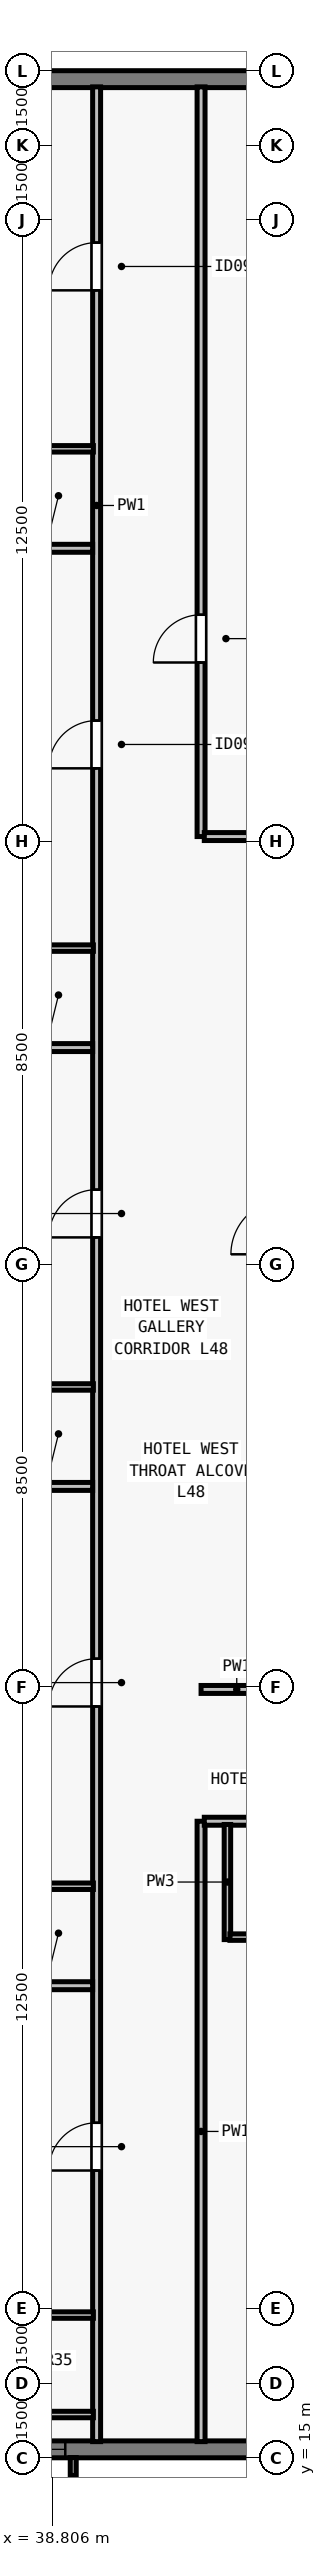
"""IFC4 building model, lengths in metres.
Left out: names, types, materials, properties, quantities, classifications, styles, units other than length and angle.
Written with IfcOpenShell. Run it as: python <this file> out.ifc"""

import sys

from ifc_helpers import new_model, si_unit, direction, frame, frame_2d, origin, place, context, subcontext, project, spatial, rectangle, extrude, element, fill, save


model = new_model("IFC4")
c1 = context("Model", 3, precision=1e-05, world=origin(), true_north=direction((0.0, 1.0)))
c2 = subcontext(c1, "Body", "Model", "MODEL_VIEW")
j1 = project(units=[si_unit("LENGTHUNIT", "METRE"), si_unit("PLANEANGLEUNIT", "RADIAN")], contexts=[c1])
p1 = place(None, origin())
s1 = spatial("IfcSite", under=j1, at=p1, CompositionType="ELEMENT")
p2 = place(p1, origin())
s2 = spatial("IfcBuilding", under=s1, at=p2, CompositionType="ELEMENT")
p3 = place(p2, frame((0.0, 0.0, 176.0)))
s3 = spatial("IfcBuildingStorey", under=s2, at=p3, CompositionType="ELEMENT", Elevation=176.0)
p4 = place(p3, frame((72.0, 15.17, 0.0), z_axis=(0.0, 0.0, 1.0), x_axis=(-1.0, 0.0, 0.0)))
e1 = element("IfcWall", 1, at=p4, inside=s3, PredefinedType="SOLIDWALL", context=c2, shape_type="SweptSolid", body=[
    extrude(rectangle(XDim=39.682, YDim=0.34, at=frame_2d((19.841, 0.0))), origin(), (0.0, 0.0, 1.0), 3.28),
])
p5 = place(p4, frame((4.102, 0.0, 0.8)))
e2 = element("IfcOpeningElement", 2, at=p5, cuts=e1, PredefinedType="OPENING", context=c2, shape_type="SweptSolid", body=[
    extrude(rectangle(XDim=1.35, YDim=1.66, at=frame_2d((0.675, 0.83))), frame((0.0, 0.18, 0.0), z_axis=(0.0, -1.0, 0.0), x_axis=(1.0, 0.0, 0.0)), (0.0, 0.0, 1.0), 0.36),
])
p6 = place(p4, frame((8.305, 0.0, 0.8)))
e3 = element("IfcOpeningElement", 3, at=p6, cuts=e1, PredefinedType="OPENING", context=c2, shape_type="SweptSolid", body=[
    extrude(rectangle(XDim=1.75, YDim=1.66, at=frame_2d((0.875, 0.83))), frame((0.0, 0.18, 0.0), z_axis=(0.0, -1.0, 0.0), x_axis=(1.0, 0.0, 0.0)), (0.0, 0.0, 1.0), 0.36),
])
p7 = place(p4, frame((12.059, 0.0, 0.8)))
e4 = element("IfcOpeningElement", 4, at=p7, cuts=e1, PredefinedType="OPENING", context=c2, shape_type="SweptSolid", body=[
    extrude(rectangle(XDim=1.35, YDim=1.66, at=frame_2d((0.675, 0.83))), frame((0.0, 0.18, 0.0), z_axis=(0.0, -1.0, 0.0), x_axis=(1.0, 0.0, 0.0)), (0.0, 0.0, 1.0), 0.36),
])
p8 = place(p4, frame((16.262, 0.0, 0.8)))
e5 = element("IfcOpeningElement", 5, at=p8, cuts=e1, PredefinedType="OPENING", context=c2, shape_type="SweptSolid", body=[
    extrude(rectangle(XDim=1.75, YDim=1.66, at=frame_2d((0.875, 0.83))), frame((0.0, 0.18, 0.0), z_axis=(0.0, -1.0, 0.0), x_axis=(1.0, 0.0, 0.0)), (0.0, 0.0, 1.0), 0.36),
])
p9 = place(p4, frame((19.166, 0.0, 0.8)))
e6 = element("IfcOpeningElement", 6, at=p9, cuts=e1, PredefinedType="OPENING", context=c2, shape_type="SweptSolid", body=[
    extrude(rectangle(XDim=1.35, YDim=1.66, at=frame_2d((0.675, 0.83))), frame((0.0, 0.18, 0.0), z_axis=(0.0, -1.0, 0.0), x_axis=(1.0, 0.0, 0.0)), (0.0, 0.0, 1.0), 0.36),
])
p10 = place(p4, frame((21.27, 0.0, 0.8)))
e7 = element("IfcOpeningElement", 7, at=p10, cuts=e1, PredefinedType="OPENING", context=c2, shape_type="SweptSolid", body=[
    extrude(rectangle(XDim=1.75, YDim=1.66, at=frame_2d((0.875, 0.83))), frame((0.0, 0.18, 0.0), z_axis=(0.0, -1.0, 0.0), x_axis=(1.0, 0.0, 0.0)), (0.0, 0.0, 1.0), 0.36),
])
p11 = place(p4, frame((26.273, 0.0, 0.8)))
e8 = element("IfcOpeningElement", 8, at=p11, cuts=e1, PredefinedType="OPENING", context=c2, shape_type="SweptSolid", body=[
    extrude(rectangle(XDim=1.35, YDim=1.66, at=frame_2d((0.675, 0.83))), frame((0.0, 0.18, 0.0), z_axis=(0.0, -1.0, 0.0), x_axis=(1.0, 0.0, 0.0)), (0.0, 0.0, 1.0), 0.36),
])
p12 = place(p4, frame((32.93, 0.0, 0.8)))
e9 = element("IfcOpeningElement", 9, at=p12, cuts=e1, PredefinedType="OPENING", context=c2, shape_type="SweptSolid", body=[
    extrude(rectangle(XDim=1.35, YDim=1.66, at=frame_2d((0.675, 0.83))), frame((0.0, 0.18, 0.0), z_axis=(0.0, -1.0, 0.0), x_axis=(1.0, 0.0, 0.0)), (0.0, 0.0, 1.0), 0.36),
])
p13 = place(p3, frame((32.0, 62.83, 0.0), z_axis=(0.0, 0.0, 1.0), x_axis=(1.0, 0.0, 0.0)))
e10 = element("IfcWall", 10, at=p13, inside=s3, PredefinedType="SOLIDWALL", context=c2, shape_type="SweptSolid", body=[
    extrude(rectangle(XDim=39.682, YDim=0.34, at=frame_2d((19.841, 0.0))), origin(), (0.0, 0.0, 1.0), 3.28),
])
p14 = place(p13, frame((4.952, 0.0, 0.8)))
e11 = element("IfcOpeningElement", 11, at=p14, cuts=e10, PredefinedType="OPENING", context=c2, shape_type="SweptSolid", body=[
    extrude(rectangle(XDim=1.35, YDim=1.66, at=frame_2d((0.675, 0.83))), frame((0.0, 0.18, 0.0), z_axis=(0.0, -1.0, 0.0), x_axis=(1.0, 0.0, 0.0)), (0.0, 0.0, 1.0), 0.36),
])
p15 = place(p13, frame((12.059, 0.0, 0.8)))
e12 = element("IfcOpeningElement", 12, at=p15, cuts=e10, PredefinedType="OPENING", context=c2, shape_type="SweptSolid", body=[
    extrude(rectangle(XDim=1.35, YDim=1.66, at=frame_2d((0.675, 0.83))), frame((0.0, 0.18, 0.0), z_axis=(0.0, -1.0, 0.0), x_axis=(1.0, 0.0, 0.0)), (0.0, 0.0, 1.0), 0.36),
])
p16 = place(p13, frame((19.166, 0.0, 0.8)))
e13 = element("IfcOpeningElement", 13, at=p16, cuts=e10, PredefinedType="OPENING", context=c2, shape_type="SweptSolid", body=[
    extrude(rectangle(XDim=1.35, YDim=1.66, at=frame_2d((0.675, 0.83))), frame((0.0, 0.18, 0.0), z_axis=(0.0, -1.0, 0.0), x_axis=(1.0, 0.0, 0.0)), (0.0, 0.0, 1.0), 0.36),
])
p17 = place(p13, frame((21.27, 0.0, 0.8)))
e14 = element("IfcOpeningElement", 14, at=p17, cuts=e10, PredefinedType="OPENING", context=c2, shape_type="SweptSolid", body=[
    extrude(rectangle(XDim=1.75, YDim=1.66, at=frame_2d((0.875, 0.83))), frame((0.0, 0.18, 0.0), z_axis=(0.0, -1.0, 0.0), x_axis=(1.0, 0.0, 0.0)), (0.0, 0.0, 1.0), 0.36),
])
p18 = place(p13, frame((26.273, 0.0, 0.8)))
e15 = element("IfcOpeningElement", 15, at=p18, cuts=e10, PredefinedType="OPENING", context=c2, shape_type="SweptSolid", body=[
    extrude(rectangle(XDim=1.35, YDim=1.66, at=frame_2d((0.675, 0.83))), frame((0.0, 0.18, 0.0), z_axis=(0.0, -1.0, 0.0), x_axis=(1.0, 0.0, 0.0)), (0.0, 0.0, 1.0), 0.36),
])
p19 = place(p13, frame((29.627, 0.0, 0.8)))
e16 = element("IfcOpeningElement", 16, at=p19, cuts=e10, PredefinedType="OPENING", context=c2, shape_type="SweptSolid", body=[
    extrude(rectangle(XDim=1.75, YDim=1.66, at=frame_2d((0.875, 0.83))), frame((0.0, 0.18, 0.0), z_axis=(0.0, -1.0, 0.0), x_axis=(1.0, 0.0, 0.0)), (0.0, 0.0, 1.0), 0.36),
])
p20 = place(p13, frame((34.47, 0.0, 0.8)))
e17 = element("IfcOpeningElement", 17, at=p20, cuts=e10, PredefinedType="OPENING", context=c2, shape_type="SweptSolid", body=[
    extrude(rectangle(XDim=0.9, YDim=1.66, at=frame_2d((0.45, 0.83))), frame((0.0, 0.18, 0.0), z_axis=(0.0, -1.0, 0.0), x_axis=(1.0, 0.0, 0.0)), (0.0, 0.0, 1.0), 0.36),
])
p21 = place(p3, frame((39.7, 15.325, 0.0), z_axis=(0.0, 0.0, 1.0), x_axis=(0.0, 1.0, 0.0)))
e18 = element("IfcWall", 18, at=p21, inside=s3, PredefinedType="PARTITIONING", context=c2, shape_type="SweptSolid", body=[
    extrude(rectangle(XDim=47.35, YDim=0.16, at=frame_2d((23.675, 0.0))), origin(), (0.0, 0.0, 1.0), 2.555),
])
p22 = place(p21, frame((5.451, 0.0, 0.0)))
e19 = element("IfcOpeningElement", 19, at=p22, cuts=e18, PredefinedType="OPENING", context=c2, shape_type="SweptSolid", body=[
    extrude(rectangle(XDim=0.96, YDim=2.15, at=frame_2d((0.48, 1.075))), frame((0.0, 0.09, 0.0), z_axis=(0.0, -1.0, 0.0), x_axis=(1.0, 0.0, 0.0)), (0.0, 0.0, 1.0), 0.18),
])
p23 = place(p21, frame((14.783, 0.0, 0.0)))
e20 = element("IfcOpeningElement", 20, at=p23, cuts=e18, PredefinedType="OPENING", context=c2, shape_type="SweptSolid", body=[
    extrude(rectangle(XDim=0.96, YDim=2.15, at=frame_2d((0.48, 1.075))), frame((0.0, 0.09, 0.0), z_axis=(0.0, -1.0, 0.0), x_axis=(1.0, 0.0, 0.0)), (0.0, 0.0, 1.0), 0.18),
])
p24 = place(p21, frame((24.215, 0.0, 0.0)))
e21 = element("IfcOpeningElement", 21, at=p24, cuts=e18, PredefinedType="OPENING", context=c2, shape_type="SweptSolid", body=[
    extrude(rectangle(XDim=0.96, YDim=2.15, at=frame_2d((0.48, 1.075))), frame((0.0, 0.09, 0.0), z_axis=(0.0, -1.0, 0.0), x_axis=(1.0, 0.0, 0.0)), (0.0, 0.0, 1.0), 0.18),
])
p25 = place(p21, frame((33.647, 0.0, 0.0)))
e22 = element("IfcOpeningElement", 22, at=p25, cuts=e18, PredefinedType="OPENING", context=c2, shape_type="SweptSolid", body=[
    extrude(rectangle(XDim=0.96, YDim=2.15, at=frame_2d((0.48, 1.075))), frame((0.0, 0.09, 0.0), z_axis=(0.0, -1.0, 0.0), x_axis=(1.0, 0.0, 0.0)), (0.0, 0.0, 1.0), 0.18),
])
p26 = place(p21, frame((43.258, 0.0, 0.0)))
e23 = element("IfcOpeningElement", 23, at=p26, cuts=e18, PredefinedType="OPENING", context=c2, shape_type="SweptSolid", body=[
    extrude(rectangle(XDim=0.96, YDim=2.15, at=frame_2d((0.48, 1.075))), frame((0.0, 0.09, 0.0), z_axis=(0.0, -1.0, 0.0), x_axis=(1.0, 0.0, 0.0)), (0.0, 0.0, 1.0), 0.18),
])
p27 = place(p3, frame((41.8, 15.325, 0.0), z_axis=(0.0, 0.0, 1.0), x_axis=(0.0, 1.0, 0.0)))
e24 = element("IfcWall", 24, at=p27, inside=s3, PredefinedType="PARTITIONING", context=c2, shape_type="SweptSolid", body=[
    extrude(rectangle(XDim=12.475, YDim=0.16, at=frame_2d((6.238, 0.0))), origin(), (0.0, 0.0, 1.0), 3.28),
])
p28 = place(p3, frame((41.8, 47.6, 0.0), z_axis=(0.0, 0.0, 1.0), x_axis=(0.0, 1.0, 0.0)))
e25 = element("IfcWall", 25, at=p28, inside=s3, PredefinedType="PARTITIONING", context=c2, shape_type="SweptSolid", body=[
    extrude(rectangle(XDim=15.075, YDim=0.16, at=frame_2d((7.538, 0.0))), origin(), (0.0, 0.0, 1.0), 2.555),
])
p29 = place(p28, frame((3.5, 0.0, 0.0)))
e26 = element("IfcOpeningElement", 26, at=p29, cuts=e25, PredefinedType="OPENING", context=c2, shape_type="SweptSolid", body=[
    extrude(rectangle(XDim=0.96, YDim=2.12, at=frame_2d((0.48, 1.06))), frame((0.0, 0.09, 0.0), z_axis=(0.0, -1.0, 0.0), x_axis=(1.0, 0.0, 0.0)), (0.0, 0.0, 1.0), 0.18),
])
p30 = place(p3, frame((41.8, 30.45, 0.0), z_axis=(0.0, 0.0, 1.0), x_axis=(1.0, 0.0, 0.0)))
e27 = element("IfcWall", 27, at=p30, inside=s3, PredefinedType="PARTITIONING", context=c2, shape_type="SweptSolid", body=[
    extrude(rectangle(XDim=1.435, YDim=0.16, at=frame_2d((0.718, 0.0))), origin(), (0.0, 0.0, 1.0), 3.28),
])
p31 = place(p3, frame((41.865, 47.6, 0.0), z_axis=(0.0, 0.0, 1.0), x_axis=(1.0, 0.0, 0.0)))
e28 = element("IfcWall", 28, at=p31, inside=s3, PredefinedType="PARTITIONING", context=c2, shape_type="SweptSolid", body=[
    extrude(rectangle(XDim=1.37, YDim=0.16, at=frame_2d((0.685, 0.0))), origin(), (0.0, 0.0, 1.0), 3.28),
])
p32 = place(p3, frame((41.865, 27.8, 0.0), z_axis=(0.0, 0.0, 1.0), x_axis=(1.0, 0.0, 0.0)))
e29 = element("IfcWall", 29, at=p32, inside=s3, PredefinedType="PARTITIONING", context=c2, shape_type="SweptSolid", body=[
    extrude(rectangle(XDim=22.07, YDim=0.16, at=frame_2d((11.035, 0.0))), origin(), (0.0, 0.0, 1.0), 3.28),
])
p33 = place(p32, frame((4.232, 0.0, 0.0)))
e30 = element("IfcOpeningElement", 30, at=p33, cuts=e29, PredefinedType="OPENING", context=c2, shape_type="SweptSolid", body=[
    extrude(rectangle(XDim=0.96, YDim=2.15, at=frame_2d((0.48, 1.075))), frame((0.0, 0.09, 0.0), z_axis=(0.0, -1.0, 0.0), x_axis=(1.0, 0.0, 0.0)), (0.0, 0.0, 1.0), 0.18),
])
p34 = place(p32, frame((11.545, 0.0, 0.0)))
e31 = element("IfcOpeningElement", 31, at=p34, cuts=e29, PredefinedType="OPENING", context=c2, shape_type="SweptSolid", body=[
    extrude(rectangle(XDim=0.96, YDim=2.15, at=frame_2d((0.48, 1.075))), frame((0.0, 0.09, 0.0), z_axis=(0.0, -1.0, 0.0), x_axis=(1.0, 0.0, 0.0)), (0.0, 0.0, 1.0), 0.18),
])
p35 = place(p32, frame((19.168, 0.0, 0.0)))
e32 = element("IfcOpeningElement", 32, at=p35, cuts=e29, PredefinedType="OPENING", context=c2, shape_type="SweptSolid", body=[
    extrude(rectangle(XDim=0.96, YDim=2.15, at=frame_2d((0.48, 1.075))), frame((0.0, 0.09, 0.0), z_axis=(0.0, -1.0, 0.0), x_axis=(1.0, 0.0, 0.0)), (0.0, 0.0, 1.0), 0.18),
])
p36 = place(p3, frame((42.33, 25.42, 0.0), z_axis=(0.0, 0.0, 1.0), x_axis=(0.0, 1.0, 0.0)))
e33 = element("IfcWall", 33, at=p36, inside=s3, PredefinedType="PLUMBINGWALL", context=c2, shape_type="SweptSolid", body=[
    extrude(rectangle(XDim=2.315, YDim=0.13, at=frame_2d((1.158, 0.0))), origin(), (0.0, 0.0, 1.0), 3.28),
])
p37 = place(p3, frame((42.38, 25.47, 0.0), z_axis=(0.0, 0.0, 1.0), x_axis=(1.0, 0.0, 0.0)))
e34 = element("IfcWall", 34, at=p37, inside=s3, PredefinedType="PLUMBINGWALL", context=c2, shape_type="SweptSolid", body=[
    extrude(rectangle(XDim=1.9, YDim=0.13, at=frame_2d((0.95, 0.0))), origin(), (0.0, 0.0, 1.0), 3.28),
])
p38 = place(p37, frame((0.54, 0.0, 0.0)))
e35 = element("IfcOpeningElement", 35, at=p38, cuts=e34, PredefinedType="OPENING", context=c2, shape_type="SweptSolid", body=[
    extrude(rectangle(XDim=0.82, YDim=2.1, at=frame_2d((0.41, 1.05))), frame((0.0, 0.075, 0.0), z_axis=(0.0, -1.0, 0.0), x_axis=(1.0, 0.0, 0.0)), (0.0, 0.0, 1.0), 0.15),
])
for number, where, z_axis, x_axis in (
    (36, (37.32, 15.87, 0.0), (0.0, 0.0, 1.0), (1.0, 0.0, 0.0)),
    (37, (37.32, 17.87, 0.0), (0.0, 0.0, 1.0), (1.0, 0.0, 0.0)),
):
    element("IfcWall", number, at=place(p3, frame(where, z_axis=z_axis, x_axis=x_axis)), inside=s3, PredefinedType="PLUMBINGWALL", context=c2, shape_type="SweptSolid", body=[
        extrude(rectangle(XDim=2.315, YDim=0.13, at=frame_2d((1.157, 0.0))), origin(), (0.0, 0.0, 1.0), 3.28),
    ])
p39 = place(p3, frame((28.325, 24.493, 0.0), z_axis=(0.0, 0.0, 1.0), x_axis=(1.0, 0.0, 0.0)))
e38 = element("IfcWall", 38, at=p39, inside=s3, PredefinedType="PARTITIONING", context=c2, shape_type="SweptSolid", body=[
    extrude(rectangle(XDim=11.295, YDim=0.16, at=frame_2d((5.647, 0.0))), origin(), (0.0, 0.0, 1.0), 2.896),
])
p40 = place(p3, frame((37.32, 26.493, 0.0), z_axis=(0.0, 0.0, 1.0), x_axis=(1.0, 0.0, 0.0)))
e39 = element("IfcWall", 39, at=p40, inside=s3, PredefinedType="PLUMBINGWALL", context=c2, shape_type="SweptSolid", body=[
    extrude(rectangle(XDim=2.315, YDim=0.13, at=frame_2d((1.157, 0.0))), origin(), (0.0, 0.0, 1.0), 2.896),
])
p41 = place(p3, frame((28.325, 34.533, 0.0), z_axis=(0.0, 0.0, 1.0), x_axis=(1.0, 0.0, 0.0)))
e40 = element("IfcWall", 40, at=p41, inside=s3, PredefinedType="PARTITIONING", context=c2, shape_type="SweptSolid", body=[
    extrude(rectangle(XDim=11.295, YDim=0.16, at=frame_2d((5.647, 0.0))), origin(), (0.0, 0.0, 1.0), 2.896),
])
p42 = place(p3, frame((37.32, 36.533, 0.0), z_axis=(0.0, 0.0, 1.0), x_axis=(1.0, 0.0, 0.0)))
e41 = element("IfcWall", 41, at=p42, inside=s3, PredefinedType="PLUMBINGWALL", context=c2, shape_type="SweptSolid", body=[
    extrude(rectangle(XDim=2.315, YDim=0.13, at=frame_2d((1.157, 0.0))), origin(), (0.0, 0.0, 1.0), 3.28),
])
p43 = place(p3, frame((28.325, 43.357, 0.0), z_axis=(0.0, 0.0, 1.0), x_axis=(1.0, 0.0, 0.0)))
e42 = element("IfcWall", 42, at=p43, inside=s3, PredefinedType="PARTITIONING", context=c2, shape_type="SweptSolid", body=[
    extrude(rectangle(XDim=11.295, YDim=0.16, at=frame_2d((5.647, 0.0))), origin(), (0.0, 0.0, 1.0), 2.896),
])
p44 = place(p3, frame((37.32, 45.357, 0.0), z_axis=(0.0, 0.0, 1.0), x_axis=(1.0, 0.0, 0.0)))
e43 = element("IfcWall", 43, at=p44, inside=s3, PredefinedType="PLUMBINGWALL", context=c2, shape_type="SweptSolid", body=[
    extrude(rectangle(XDim=2.315, YDim=0.13, at=frame_2d((1.157, 0.0))), origin(), (0.0, 0.0, 1.0), 3.28),
])
p45 = place(p3, frame((28.325, 53.396, 0.0), z_axis=(0.0, 0.0, 1.0), x_axis=(1.0, 0.0, 0.0)))
e44 = element("IfcWall", 44, at=p45, inside=s3, PredefinedType="PARTITIONING", context=c2, shape_type="SweptSolid", body=[
    extrude(rectangle(XDim=11.295, YDim=0.16, at=frame_2d((5.647, 0.0))), origin(), (0.0, 0.0, 1.0), 2.896),
])
p46 = place(p3, frame((37.32, 55.396, 0.0), z_axis=(0.0, 0.0, 1.0), x_axis=(1.0, 0.0, 0.0)))
e45 = element("IfcWall", 45, at=p46, inside=s3, PredefinedType="PLUMBINGWALL", context=c2, shape_type="SweptSolid", body=[
    extrude(rectangle(XDim=2.315, YDim=0.13, at=frame_2d((1.157, 0.0))), origin(), (0.0, 0.0, 1.0), 3.28),
])
p47 = place(p12, origin())
e46 = element("IfcWindow", 46, at=p47, inside=s3, PartitioningType="SINGLE_PANEL", PredefinedType="WINDOW", context=c2, shape_type="SweptSolid", body=[
    extrude(rectangle(XDim=1.35, YDim=1.66, at=frame_2d((0.675, 0.83))), frame((0.0, -0.05, 0.0), z_axis=(0.0, -1.0, 0.0), x_axis=(1.0, 0.0, 0.0)), (0.0, 0.0, 1.0), 0.06),
])
fill(e9, e46)
p48 = place(p29, origin())
e47 = element("IfcDoor", 47, at=p48, inside=s3, OperationType="SINGLE_SWING_LEFT", PredefinedType="DOOR", context=c2, shape_type="SweptSolid", body=[
    extrude(rectangle(XDim=0.96, YDim=2.12, at=frame_2d((0.48, 1.06))), frame((0.0, 0.025, 0.0), z_axis=(0.0, -1.0, 0.0), x_axis=(1.0, 0.0, 0.0)), (0.0, 0.0, 1.0), 0.05),
])
fill(e26, e47)
p49 = place(p22, origin())
e48 = element("IfcDoor", 48, at=p49, inside=s3, OperationType="SINGLE_SWING_LEFT", PredefinedType="DOOR", context=c2, shape_type="SweptSolid", body=[
    extrude(rectangle(XDim=0.96, YDim=2.15, at=frame_2d((0.48, 1.075))), frame((0.0, 0.025, 0.0), z_axis=(0.0, -1.0, 0.0), x_axis=(1.0, 0.0, 0.0)), (0.0, 0.0, 1.0), 0.05),
])
fill(e19, e48)
p50 = place(p23, origin())
e49 = element("IfcDoor", 49, at=p50, inside=s3, OperationType="SINGLE_SWING_LEFT", PredefinedType="DOOR", context=c2, shape_type="SweptSolid", body=[
    extrude(rectangle(XDim=0.96, YDim=2.15, at=frame_2d((0.48, 1.075))), frame((0.0, 0.025, 0.0), z_axis=(0.0, -1.0, 0.0), x_axis=(1.0, 0.0, 0.0)), (0.0, 0.0, 1.0), 0.05),
])
fill(e20, e49)
p51 = place(p24, origin())
e50 = element("IfcDoor", 50, at=p51, inside=s3, OperationType="SINGLE_SWING_LEFT", PredefinedType="DOOR", context=c2, shape_type="SweptSolid", body=[
    extrude(rectangle(XDim=0.96, YDim=2.15, at=frame_2d((0.48, 1.075))), frame((0.0, 0.025, 0.0), z_axis=(0.0, -1.0, 0.0), x_axis=(1.0, 0.0, 0.0)), (0.0, 0.0, 1.0), 0.05),
])
fill(e21, e50)
p52 = place(p25, origin())
e51 = element("IfcDoor", 51, at=p52, inside=s3, OperationType="SINGLE_SWING_LEFT", PredefinedType="DOOR", context=c2, shape_type="SweptSolid", body=[
    extrude(rectangle(XDim=0.96, YDim=2.15, at=frame_2d((0.48, 1.075))), frame((0.0, 0.025, 0.0), z_axis=(0.0, -1.0, 0.0), x_axis=(1.0, 0.0, 0.0)), (0.0, 0.0, 1.0), 0.05),
])
fill(e22, e51)
p53 = place(p26, origin())
e52 = element("IfcDoor", 52, at=p53, inside=s3, OperationType="SINGLE_SWING_LEFT", PredefinedType="DOOR", context=c2, shape_type="SweptSolid", body=[
    extrude(rectangle(XDim=0.96, YDim=2.15, at=frame_2d((0.48, 1.075))), frame((0.0, 0.025, 0.0), z_axis=(0.0, -1.0, 0.0), x_axis=(1.0, 0.0, 0.0)), (0.0, 0.0, 1.0), 0.05),
])
fill(e23, e52)
save(model, sys.argv[1])
